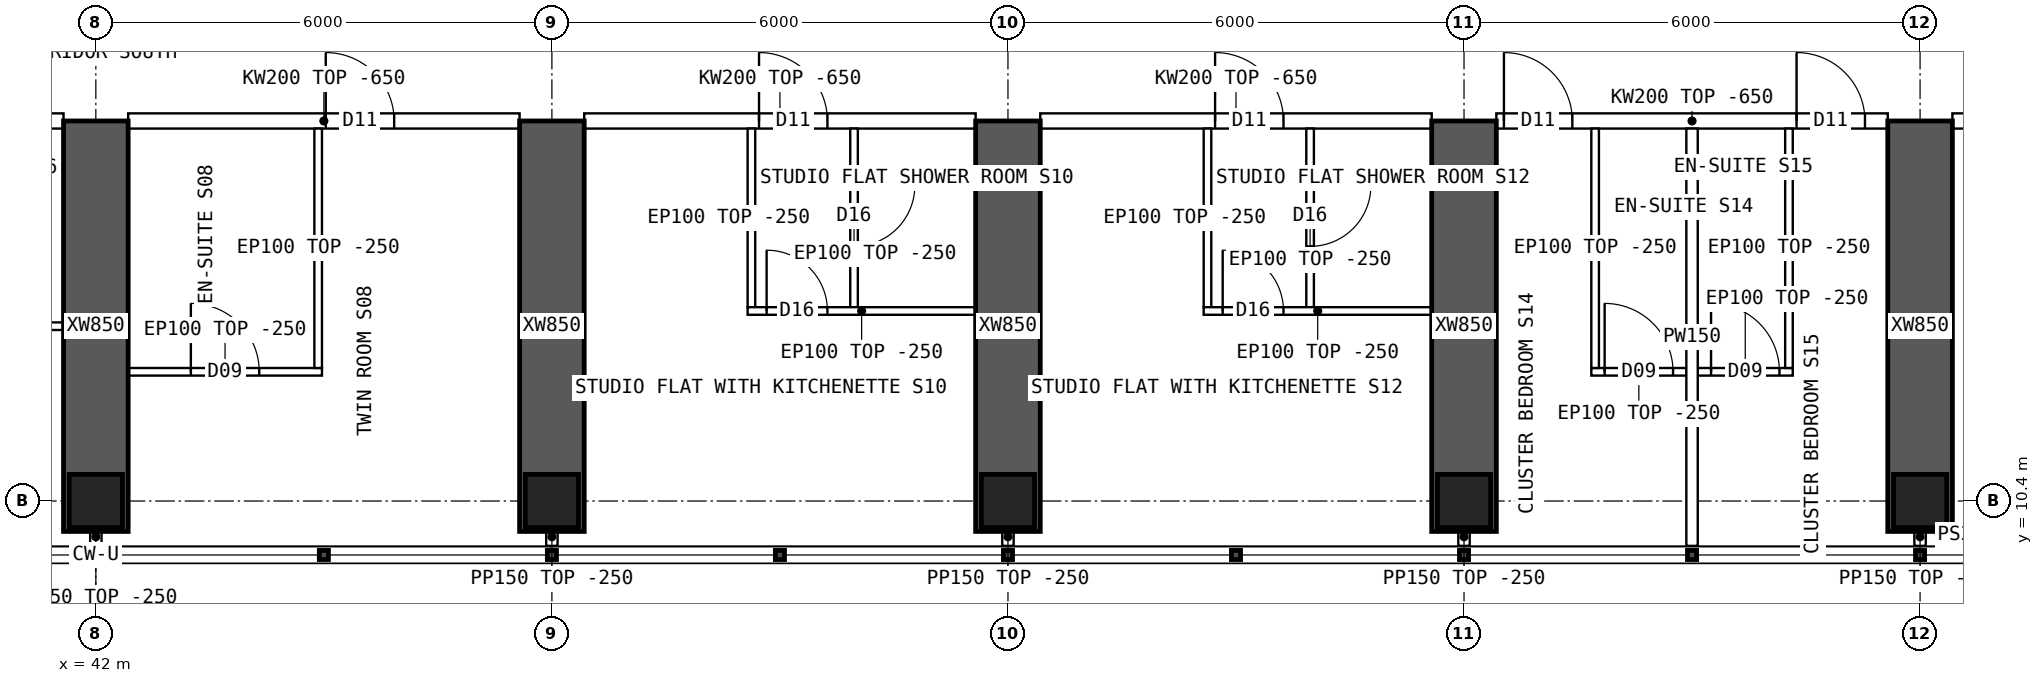
"""IFC4 building model, lengths in metres.
Left out: names, types, materials, properties, quantities, classifications, styles, units other than length and angle.
Written with IfcOpenShell. Run it as: python <this file> out.ifc"""

import sys

from ifc_helpers import new_model, si_unit, direction, frame, frame_2d, origin, origin_2d, place, context, subcontext, project, spatial, polyline, rectangle, hollow_rectangle, outline, extrude, element, fill, save


model = new_model("IFC4")
c1 = context("Model", 3, precision=1e-05, world=origin(), true_north=direction((0.0, 1.0)))
c2 = subcontext(c1, "Body", "Model", "MODEL_VIEW")
j1 = project(units=[si_unit("LENGTHUNIT", "METRE"), si_unit("PLANEANGLEUNIT", "RADIAN")], contexts=[c1])
p1 = place(None, origin())
s1 = spatial("IfcSite", under=j1, at=p1, CompositionType="ELEMENT")
p2 = place(p1, origin())
s2 = spatial("IfcBuilding", under=s1, at=p2, CompositionType="ELEMENT")
p3 = place(p2, frame((0.0, 0.0, 178.6)))
s3 = spatial("IfcBuildingStorey", under=s2, at=p3, CompositionType="ELEMENT", Elevation=178.6)
for number, where, z_axis, x_axis in (
    (1, (42.0, 10.4, 0.0), (0.0, 0.0, 1.0), (1.0, 0.0, 0.0)),
    (2, (48.0, 10.4, 0.0), (0.0, 0.0, 1.0), (1.0, 0.0, 0.0)),
    (3, (54.0, 10.4, 0.0), (0.0, 0.0, 1.0), (1.0, 0.0, 0.0)),
    (4, (60.0, 10.4, 0.0), (0.0, 0.0, 1.0), (1.0, 0.0, 0.0)),
    (5, (66.0, 10.4, 0.0), (0.0, 0.0, 1.0), (1.0, 0.0, 0.0)),
):
    element("IfcColumn", number, at=place(p3, frame(where, z_axis=z_axis, x_axis=x_axis)), inside=s3, PredefinedType="COLUMN", context=c2, shape_type="SweptSolid", body=[
        extrude(hollow_rectangle(XDim=0.7, YDim=0.7, WallThickness=0.07, at=origin_2d()), origin(), (0.0, 0.0, 1.0), 3.75),
    ])
for number, where, z_axis, x_axis in (
    (6, (42.0, 10.0, 0.0), (0.0, 0.0, 1.0), (0.0, 1.0, 0.0)),
    (7, (48.0, 10.0, 0.0), (0.0, 0.0, 1.0), (0.0, 1.0, 0.0)),
    (8, (54.0, 10.0, 0.0), (0.0, 0.0, 1.0), (0.0, 1.0, 0.0)),
    (9, (60.0, 10.0, 0.0), (0.0, 0.0, 1.0), (0.0, 1.0, 0.0)),
    (10, (66.0, 10.0, 0.0), (0.0, 0.0, 1.0), (0.0, 1.0, 0.0)),
):
    element("IfcWall", number, at=place(p3, frame(where, z_axis=z_axis, x_axis=x_axis)), inside=s3, PredefinedType="SHEAR", context=c2, shape_type="SweptSolid", body=[
        extrude(rectangle(XDim=5.4, YDim=0.85, at=frame_2d((2.7, 0.0))), origin(), (0.0, 0.0, 1.0), 3.75),
    ])
p4 = place(p3, frame((66.8, 9.95, 0.0), z_axis=(0.0, 0.0, 1.0), x_axis=(-1.0, 0.0, 0.0)))
e11 = element("IfcWall", 11, at=p4, inside=s3, PredefinedType="SOLIDWALL", context=c2, shape_type="SweptSolid", body=[
    extrude(rectangle(XDim=0.375, YDim=0.3, at=frame_2d((0.188, 0.0))), origin(), (0.0, 0.0, 1.0), 3.5),
])
p5 = place(p3, frame((36.425, 15.4, 0.0), z_axis=(0.0, 0.0, 1.0), x_axis=(1.0, 0.0, 0.0)))
e12 = element("IfcWall", 12, at=p5, inside=s3, PredefinedType="SOLIDWALL", context=c2, shape_type="SweptSolid", body=[
    extrude(outline(polyline([(0.0, 0.0), (5.15, 0.0), (5.15, 3.1), (0.0, 3.1), (0.0, 0.0)])), frame((0.0, 0.1, 0.0), z_axis=(0.0, -1.0, 0.0), x_axis=(1.0, 0.0, 0.0)), (0.0, 0.0, 1.0), 0.2),
])
p6 = place(p5, frame((0.3, 0.0, 0.0)))
e13 = element("IfcOpeningElement", 13, at=p6, cuts=e12, PredefinedType="OPENING", context=c2, shape_type="SweptSolid", body=[
    extrude(rectangle(XDim=1.0, YDim=2.1, at=frame_2d((0.5, 1.05))), frame((0.0, 0.11, 0.0), z_axis=(0.0, -1.0, 0.0), x_axis=(1.0, 0.0, 0.0)), (0.0, 0.0, 1.0), 0.22),
])
p7 = place(p3, frame((42.425, 15.4, 0.0), z_axis=(0.0, 0.0, 1.0), x_axis=(1.0, 0.0, 0.0)))
e14 = element("IfcWall", 14, at=p7, inside=s3, PredefinedType="SOLIDWALL", context=c2, shape_type="SweptSolid", body=[
    extrude(outline(polyline([(0.0, 0.0), (5.15, 0.0), (5.15, 3.1), (0.0, 3.1), (0.0, 0.0)])), frame((0.0, 0.1, 0.0), z_axis=(0.0, -1.0, 0.0), x_axis=(1.0, 0.0, 0.0)), (0.0, 0.0, 1.0), 0.2),
])
p8 = place(p7, frame((2.6, 0.0, 0.0)))
e15 = element("IfcOpeningElement", 15, at=p8, cuts=e14, PredefinedType="OPENING", context=c2, shape_type="SweptSolid", body=[
    extrude(rectangle(XDim=0.9, YDim=2.1, at=frame_2d((0.45, 1.05))), frame((0.0, 0.11, 0.0), z_axis=(0.0, -1.0, 0.0), x_axis=(1.0, 0.0, 0.0)), (0.0, 0.0, 1.0), 0.22),
])
p9 = place(p3, frame((48.425, 15.4, 0.0), z_axis=(0.0, 0.0, 1.0), x_axis=(1.0, 0.0, 0.0)))
e16 = element("IfcWall", 16, at=p9, inside=s3, PredefinedType="SOLIDWALL", context=c2, shape_type="SweptSolid", body=[
    extrude(outline(polyline([(0.0, 0.0), (5.15, 0.0), (5.15, 3.1), (0.0, 3.1), (0.0, 0.0)])), frame((0.0, 0.1, 0.0), z_axis=(0.0, -1.0, 0.0), x_axis=(1.0, 0.0, 0.0)), (0.0, 0.0, 1.0), 0.2),
])
p10 = place(p9, frame((2.3, 0.0, 0.0)))
e17 = element("IfcOpeningElement", 17, at=p10, cuts=e16, PredefinedType="OPENING", context=c2, shape_type="SweptSolid", body=[
    extrude(rectangle(XDim=0.9, YDim=2.1, at=frame_2d((0.45, 1.05))), frame((0.0, 0.11, 0.0), z_axis=(0.0, -1.0, 0.0), x_axis=(1.0, 0.0, 0.0)), (0.0, 0.0, 1.0), 0.22),
])
p11 = place(p3, frame((54.425, 15.4, 0.0), z_axis=(0.0, 0.0, 1.0), x_axis=(1.0, 0.0, 0.0)))
e18 = element("IfcWall", 18, at=p11, inside=s3, PredefinedType="SOLIDWALL", context=c2, shape_type="SweptSolid", body=[
    extrude(outline(polyline([(0.0, 0.0), (5.15, 0.0), (5.15, 3.1), (0.0, 3.1), (0.0, 0.0)])), frame((0.0, 0.1, 0.0), z_axis=(0.0, -1.0, 0.0), x_axis=(1.0, 0.0, 0.0)), (0.0, 0.0, 1.0), 0.2),
])
p12 = place(p11, frame((2.3, 0.0, 0.0)))
e19 = element("IfcOpeningElement", 19, at=p12, cuts=e18, PredefinedType="OPENING", context=c2, shape_type="SweptSolid", body=[
    extrude(rectangle(XDim=0.9, YDim=2.1, at=frame_2d((0.45, 1.05))), frame((0.0, 0.11, 0.0), z_axis=(0.0, -1.0, 0.0), x_axis=(1.0, 0.0, 0.0)), (0.0, 0.0, 1.0), 0.22),
])
p13 = place(p3, frame((60.425, 15.4, 0.0), z_axis=(0.0, 0.0, 1.0), x_axis=(1.0, 0.0, 0.0)))
e20 = element("IfcWall", 20, at=p13, inside=s3, PredefinedType="SOLIDWALL", context=c2, shape_type="SweptSolid", body=[
    extrude(outline(polyline([(0.0, 0.0), (5.15, 0.0), (5.15, 3.1), (0.0, 3.1), (0.0, 0.0)])), frame((0.0, 0.1, 0.0), z_axis=(0.0, -1.0, 0.0), x_axis=(1.0, 0.0, 0.0)), (0.0, 0.0, 1.0), 0.2),
])
p14 = place(p13, frame((0.1, 0.0, 0.0)))
e21 = element("IfcOpeningElement", 21, at=p14, cuts=e20, PredefinedType="OPENING", context=c2, shape_type="SweptSolid", body=[
    extrude(rectangle(XDim=0.9, YDim=2.1, at=frame_2d((0.45, 1.05))), frame((0.0, 0.11, 0.0), z_axis=(0.0, -1.0, 0.0), x_axis=(1.0, 0.0, 0.0)), (0.0, 0.0, 1.0), 0.22),
])
p15 = place(p13, frame((3.95, 0.0, 0.0)))
e22 = element("IfcOpeningElement", 22, at=p15, cuts=e20, PredefinedType="OPENING", context=c2, shape_type="SweptSolid", body=[
    extrude(rectangle(XDim=0.9, YDim=2.1, at=frame_2d((0.45, 1.05))), frame((0.0, 0.11, 0.0), z_axis=(0.0, -1.0, 0.0), x_axis=(1.0, 0.0, 0.0)), (0.0, 0.0, 1.0), 0.22),
])
p16 = place(p3, frame((66.425, 15.4, 0.0), z_axis=(0.0, 0.0, 1.0), x_axis=(1.0, 0.0, 0.0)))
e23 = element("IfcWall", 23, at=p16, inside=s3, PredefinedType="SOLIDWALL", context=c2, shape_type="SweptSolid", body=[
    extrude(rectangle(XDim=1.975, YDim=0.2, at=frame_2d((0.987, 0.0))), origin(), (0.0, 0.0, 1.0), 3.5),
])
p17 = place(p16, frame((0.2, 0.0, 0.0)))
e24 = element("IfcOpeningElement", 24, at=p17, cuts=e23, PredefinedType="OPENING", context=c2, shape_type="SweptSolid", body=[
    extrude(rectangle(XDim=0.9, YDim=2.1, at=frame_2d((0.45, 1.05))), frame((0.0, 0.11, 0.0), z_axis=(0.0, -1.0, 0.0), x_axis=(1.0, 0.0, 0.0)), (0.0, 0.0, 1.0), 0.22),
])
p18 = place(p3, frame((38.925, 12.7, 0.0), z_axis=(0.0, 0.0, 1.0), x_axis=(1.0, 0.0, 0.0)))
e25 = element("IfcWall", 25, at=p18, inside=s3, PredefinedType="PARTITIONING", context=c2, shape_type="SweptSolid", body=[
    extrude(rectangle(XDim=2.65, YDim=0.1, at=frame_2d((1.325, 0.0))), origin(), (0.0, 0.0, 1.0), 3.5),
])
p19 = place(p3, frame((44.975, 12.1, 0.0), z_axis=(0.0, 0.0, 1.0), x_axis=(-1.0, 0.0, 0.0)))
e26 = element("IfcWall", 26, at=p19, inside=s3, PredefinedType="PARTITIONING", context=c2, shape_type="SweptSolid", body=[
    extrude(rectangle(XDim=2.55, YDim=0.1, at=frame_2d((1.275, 0.0))), origin(), (0.0, 0.0, 1.0), 3.5),
])
p20 = place(p19, frame((0.825, 0.0, 0.0)))
e27 = element("IfcOpeningElement", 27, at=p20, cuts=e26, PredefinedType="OPENING", context=c2, shape_type="SweptSolid", body=[
    extrude(rectangle(XDim=0.9, YDim=2.1, at=frame_2d((0.45, 1.05))), frame((0.0, 0.06, 0.0), z_axis=(0.0, -1.0, 0.0), x_axis=(1.0, 0.0, 0.0)), (0.0, 0.0, 1.0), 0.12),
])
p21 = place(p3, frame((44.925, 12.15, 0.0), z_axis=(0.0, 0.0, 1.0), x_axis=(0.0, 1.0, 0.0)))
e28 = element("IfcWall", 28, at=p21, inside=s3, PredefinedType="PARTITIONING", context=c2, shape_type="SweptSolid", body=[
    extrude(outline(polyline([(0.0, 0.0), (3.15, 0.0), (3.15, 3.1), (3.102, 3.1), (3.1, 3.5), (0.0, 3.5), (0.0, 0.0)])), frame((0.0, 0.05, 0.0), z_axis=(0.0, -1.0, 0.0), x_axis=(1.0, 0.0, 0.0)), (0.0, 0.0, 1.0), 0.1),
])
p22 = place(p3, frame((53.575, 12.9, 0.0), z_axis=(0.0, 0.0, 1.0), x_axis=(-1.0, 0.0, 0.0)))
e29 = element("IfcWall", 29, at=p22, inside=s3, PredefinedType="PARTITIONING", context=c2, shape_type="SweptSolid", body=[
    extrude(rectangle(XDim=3.0, YDim=0.1, at=frame_2d((1.5, 0.0))), origin(), (0.0, 0.0, 1.0), 3.5),
])
p23 = place(p22, frame((1.95, 0.0, 0.0)))
e30 = element("IfcOpeningElement", 30, at=p23, cuts=e29, PredefinedType="OPENING", context=c2, shape_type="SweptSolid", body=[
    extrude(rectangle(XDim=0.8, YDim=2.1, at=frame_2d((0.4, 1.05))), frame((0.0, 0.06, 0.0), z_axis=(0.0, -1.0, 0.0), x_axis=(1.0, 0.0, 0.0)), (0.0, 0.0, 1.0), 0.12),
])
p24 = place(p3, frame((50.625, 12.95, 0.0), z_axis=(0.0, 0.0, 1.0), x_axis=(0.0, 1.0, 0.0)))
e31 = element("IfcWall", 31, at=p24, inside=s3, PredefinedType="PARTITIONING", context=c2, shape_type="SweptSolid", body=[
    extrude(outline(polyline([(0.0, 0.0), (2.35, 0.0), (2.35, 3.1), (2.302, 3.1), (2.3, 3.5), (0.0, 3.5), (0.0, 0.0)])), frame((0.0, 0.05, 0.0), z_axis=(0.0, -1.0, 0.0), x_axis=(1.0, 0.0, 0.0)), (0.0, 0.0, 1.0), 0.1),
])
p25 = place(p3, frame((51.975, 12.95, 0.0), z_axis=(0.0, 0.0, 1.0), x_axis=(0.0, 1.0, 0.0)))
e32 = element("IfcWall", 32, at=p25, inside=s3, PredefinedType="PARTITIONING", context=c2, shape_type="SweptSolid", body=[
    extrude(outline(polyline([(0.0, 0.0), (2.35, 0.0), (2.35, 3.1), (2.302, 3.1), (2.3, 3.5), (0.0, 3.5), (0.0, 0.0)])), frame((0.0, 0.05, 0.0), z_axis=(0.0, -1.0, 0.0), x_axis=(1.0, 0.0, 0.0)), (0.0, 0.0, 1.0), 0.1),
])
p26 = place(p25, frame((0.8, 0.0, 0.0)))
e33 = element("IfcOpeningElement", 33, at=p26, cuts=e32, PredefinedType="OPENING", context=c2, shape_type="SweptSolid", body=[
    extrude(rectangle(XDim=0.8, YDim=2.1, at=frame_2d((0.4, 1.05))), frame((0.0, 0.06, 0.0), z_axis=(0.0, -1.0, 0.0), x_axis=(1.0, 0.0, 0.0)), (0.0, 0.0, 1.0), 0.12),
])
p27 = place(p3, frame((59.575, 12.9, 0.0), z_axis=(0.0, 0.0, 1.0), x_axis=(-1.0, 0.0, 0.0)))
e34 = element("IfcWall", 34, at=p27, inside=s3, PredefinedType="PARTITIONING", context=c2, shape_type="SweptSolid", body=[
    extrude(rectangle(XDim=3.0, YDim=0.1, at=frame_2d((1.5, 0.0))), origin(), (0.0, 0.0, 1.0), 3.5),
])
p28 = place(p27, frame((1.95, 0.0, 0.0)))
e35 = element("IfcOpeningElement", 35, at=p28, cuts=e34, PredefinedType="OPENING", context=c2, shape_type="SweptSolid", body=[
    extrude(rectangle(XDim=0.8, YDim=2.1, at=frame_2d((0.4, 1.05))), frame((0.0, 0.06, 0.0), z_axis=(0.0, -1.0, 0.0), x_axis=(1.0, 0.0, 0.0)), (0.0, 0.0, 1.0), 0.12),
])
p29 = place(p3, frame((56.625, 12.95, 0.0), z_axis=(0.0, 0.0, 1.0), x_axis=(0.0, 1.0, 0.0)))
e36 = element("IfcWall", 36, at=p29, inside=s3, PredefinedType="PARTITIONING", context=c2, shape_type="SweptSolid", body=[
    extrude(outline(polyline([(0.0, 0.0), (2.35, 0.0), (2.35, 3.1), (2.302, 3.1), (2.3, 3.5), (0.0, 3.5), (0.0, 0.0)])), frame((0.0, 0.05, 0.0), z_axis=(0.0, -1.0, 0.0), x_axis=(1.0, 0.0, 0.0)), (0.0, 0.0, 1.0), 0.1),
])
p30 = place(p3, frame((57.975, 12.95, 0.0), z_axis=(0.0, 0.0, 1.0), x_axis=(0.0, 1.0, 0.0)))
e37 = element("IfcWall", 37, at=p30, inside=s3, PredefinedType="PARTITIONING", context=c2, shape_type="SweptSolid", body=[
    extrude(outline(polyline([(0.0, 0.0), (2.35, 0.0), (2.35, 3.1), (2.302, 3.1), (2.3, 3.5), (0.0, 3.5), (0.0, 0.0)])), frame((0.0, 0.05, 0.0), z_axis=(0.0, -1.0, 0.0), x_axis=(1.0, 0.0, 0.0)), (0.0, 0.0, 1.0), 0.1),
])
p31 = place(p30, frame((0.8, 0.0, 0.0)))
e38 = element("IfcOpeningElement", 38, at=p31, cuts=e37, PredefinedType="OPENING", context=c2, shape_type="SweptSolid", body=[
    extrude(rectangle(XDim=0.8, YDim=2.1, at=frame_2d((0.4, 1.05))), frame((0.0, 0.06, 0.0), z_axis=(0.0, -1.0, 0.0), x_axis=(1.0, 0.0, 0.0)), (0.0, 0.0, 1.0), 0.12),
])
p32 = place(p3, frame((63.0, 9.81, 0.0), z_axis=(0.0, 0.0, 1.0), x_axis=(0.0, 1.0, 0.0)))
e39 = element("IfcWall", 39, at=p32, inside=s3, PredefinedType="PARTITIONING", context=c2, shape_type="SweptSolid", body=[
    extrude(outline(polyline([(0.0, 0.0), (5.49, 0.0), (5.49, 3.1), (5.442, 3.1), (5.44, 3.5), (0.792, 3.5), (0.79, 3.1), (0.392, 3.1), (0.39, 3.5), (0.0, 3.5), (0.0, 0.0)])), frame((0.0, 0.075, 0.0), z_axis=(0.0, -1.0, 0.0), x_axis=(1.0, 0.0, 0.0)), (0.0, 0.0, 1.0), 0.15),
])
p33 = place(p3, frame((62.925, 12.1, 0.0), z_axis=(0.0, 0.0, 1.0), x_axis=(-1.0, 0.0, 0.0)))
e40 = element("IfcWall", 40, at=p33, inside=s3, PredefinedType="PARTITIONING", context=c2, shape_type="SweptSolid", body=[
    extrude(rectangle(XDim=1.25, YDim=0.1, at=frame_2d((0.625, 0.0))), origin(), (0.0, 0.0, 1.0), 3.5),
])
p34 = place(p33, frame((0.175, 0.0, 0.0)))
e41 = element("IfcOpeningElement", 41, at=p34, cuts=e40, PredefinedType="OPENING", context=c2, shape_type="SweptSolid", body=[
    extrude(rectangle(XDim=0.9, YDim=2.1, at=frame_2d((0.45, 1.05))), frame((0.0, 0.06, 0.0), z_axis=(0.0, -1.0, 0.0), x_axis=(1.0, 0.0, 0.0)), (0.0, 0.0, 1.0), 0.12),
])
p35 = place(p3, frame((61.725, 12.15, 0.0), z_axis=(0.0, 0.0, 1.0), x_axis=(0.0, 1.0, 0.0)))
e42 = element("IfcWall", 42, at=p35, inside=s3, PredefinedType="PARTITIONING", context=c2, shape_type="SweptSolid", body=[
    extrude(outline(polyline([(0.0, 0.0), (3.15, 0.0), (3.15, 3.1), (3.102, 3.1), (3.1, 3.5), (0.0, 3.5), (0.0, 0.0)])), frame((0.0, 0.05, 0.0), z_axis=(0.0, -1.0, 0.0), x_axis=(1.0, 0.0, 0.0)), (0.0, 0.0, 1.0), 0.1),
])
p36 = place(p3, frame((64.325, 12.1, 0.0), z_axis=(0.0, 0.0, 1.0), x_axis=(-1.0, 0.0, 0.0)))
e43 = element("IfcWall", 43, at=p36, inside=s3, PredefinedType="PARTITIONING", context=c2, shape_type="SweptSolid", body=[
    extrude(rectangle(XDim=1.25, YDim=0.1, at=frame_2d((0.625, 0.0))), origin(), (0.0, 0.0, 1.0), 3.5),
])
p37 = place(p36, frame((0.175, 0.0, 0.0)))
e44 = element("IfcOpeningElement", 44, at=p37, cuts=e43, PredefinedType="OPENING", context=c2, shape_type="SweptSolid", body=[
    extrude(rectangle(XDim=0.9, YDim=2.1, at=frame_2d((0.45, 1.05))), frame((0.0, 0.06, 0.0), z_axis=(0.0, -1.0, 0.0), x_axis=(1.0, 0.0, 0.0)), (0.0, 0.0, 1.0), 0.12),
])
p38 = place(p3, frame((64.275, 12.15, 0.0), z_axis=(0.0, 0.0, 1.0), x_axis=(0.0, 1.0, 0.0)))
e45 = element("IfcWall", 45, at=p38, inside=s3, PredefinedType="PARTITIONING", context=c2, shape_type="SweptSolid", body=[
    extrude(outline(polyline([(0.0, 0.0), (3.15, 0.0), (3.15, 3.1), (3.102, 3.1), (3.1, 3.5), (0.0, 3.5), (0.0, 0.0)])), frame((0.0, 0.05, 0.0), z_axis=(0.0, -1.0, 0.0), x_axis=(1.0, 0.0, 0.0)), (0.0, 0.0, 1.0), 0.1),
])
for number, where, z_axis, x_axis in (
    (46, (42.0, 10.05, 0.0), (0.0, 0.0, 1.0), (0.0, -1.0, 0.0)),
    (47, (48.0, 10.05, 0.0), (0.0, 0.0, 1.0), (0.0, -1.0, 0.0)),
    (48, (54.0, 10.05, 0.0), (0.0, 0.0, 1.0), (0.0, -1.0, 0.0)),
    (49, (60.0, 10.05, 0.0), (0.0, 0.0, 1.0), (0.0, -1.0, 0.0)),
    (50, (66.0, 10.05, 0.0), (0.0, 0.0, 1.0), (0.0, -1.0, 0.0)),
):
    element("IfcWall", number, at=place(p3, frame(where, z_axis=z_axis, x_axis=x_axis)), inside=s3, PredefinedType="PARTITIONING", context=c2, shape_type="SweptSolid", body=[
        extrude(rectangle(XDim=0.24, YDim=0.15, at=frame_2d((0.12, 0.0))), origin(), (0.0, 0.0, 1.0), 3.5),
    ])
p39 = place(p20, origin())
e51 = element("IfcDoor", 51, at=p39, inside=s3, OperationType="SINGLE_SWING_RIGHT", PredefinedType="DOOR", context=c2, shape_type="SweptSolid", body=[
    extrude(rectangle(XDim=0.9, YDim=2.1, at=frame_2d((0.45, 1.05))), frame((0.0, 0.025, 0.0), z_axis=(0.0, -1.0, 0.0), x_axis=(1.0, 0.0, 0.0)), (0.0, 0.0, 1.0), 0.05),
])
fill(e27, e51)
p40 = place(p8, origin())
e52 = element("IfcDoor", 52, at=p40, inside=s3, OperationType="SINGLE_SWING_LEFT", PredefinedType="DOOR", context=c2, shape_type="SweptSolid", body=[
    extrude(rectangle(XDim=0.9, YDim=2.1, at=frame_2d((0.45, 1.05))), frame((0.0, 0.025, 0.0), z_axis=(0.0, -1.0, 0.0), x_axis=(1.0, 0.0, 0.0)), (0.0, 0.0, 1.0), 0.05),
])
fill(e15, e52)
p41 = place(p23, origin())
e53 = element("IfcDoor", 53, at=p41, inside=s3, OperationType="SINGLE_SWING_RIGHT", PredefinedType="DOOR", context=c2, shape_type="SweptSolid", body=[
    extrude(rectangle(XDim=0.8, YDim=2.1, at=frame_2d((0.4, 1.05))), frame((0.0, 0.025, 0.0), z_axis=(0.0, -1.0, 0.0), x_axis=(1.0, 0.0, 0.0)), (0.0, 0.0, 1.0), 0.05),
])
fill(e30, e53)
p42 = place(p26, origin())
e54 = element("IfcDoor", 54, at=p42, inside=s3, OperationType="SINGLE_SWING_RIGHT", PredefinedType="DOOR", context=c2, shape_type="SweptSolid", body=[
    extrude(rectangle(XDim=0.8, YDim=2.1, at=frame_2d((0.4, 1.05))), frame((0.0, 0.025, 0.0), z_axis=(0.0, -1.0, 0.0), x_axis=(1.0, 0.0, 0.0)), (0.0, 0.0, 1.0), 0.05),
])
fill(e33, e54)
p43 = place(p10, origin())
e55 = element("IfcDoor", 55, at=p43, inside=s3, OperationType="SINGLE_SWING_LEFT", PredefinedType="DOOR", context=c2, shape_type="SweptSolid", body=[
    extrude(rectangle(XDim=0.9, YDim=2.1, at=frame_2d((0.45, 1.05))), frame((0.0, 0.025, 0.0), z_axis=(0.0, -1.0, 0.0), x_axis=(1.0, 0.0, 0.0)), (0.0, 0.0, 1.0), 0.05),
])
fill(e17, e55)
p44 = place(p28, origin())
e56 = element("IfcDoor", 56, at=p44, inside=s3, OperationType="SINGLE_SWING_RIGHT", PredefinedType="DOOR", context=c2, shape_type="SweptSolid", body=[
    extrude(rectangle(XDim=0.8, YDim=2.1, at=frame_2d((0.4, 1.05))), frame((0.0, 0.025, 0.0), z_axis=(0.0, -1.0, 0.0), x_axis=(1.0, 0.0, 0.0)), (0.0, 0.0, 1.0), 0.05),
])
fill(e35, e56)
p45 = place(p31, origin())
e57 = element("IfcDoor", 57, at=p45, inside=s3, OperationType="SINGLE_SWING_RIGHT", PredefinedType="DOOR", context=c2, shape_type="SweptSolid", body=[
    extrude(rectangle(XDim=0.8, YDim=2.1, at=frame_2d((0.4, 1.05))), frame((0.0, 0.025, 0.0), z_axis=(0.0, -1.0, 0.0), x_axis=(1.0, 0.0, 0.0)), (0.0, 0.0, 1.0), 0.05),
])
fill(e38, e57)
p46 = place(p12, origin())
e58 = element("IfcDoor", 58, at=p46, inside=s3, OperationType="SINGLE_SWING_LEFT", PredefinedType="DOOR", context=c2, shape_type="SweptSolid", body=[
    extrude(rectangle(XDim=0.9, YDim=2.1, at=frame_2d((0.45, 1.05))), frame((0.0, 0.025, 0.0), z_axis=(0.0, -1.0, 0.0), x_axis=(1.0, 0.0, 0.0)), (0.0, 0.0, 1.0), 0.05),
])
fill(e19, e58)
p47 = place(p34, origin())
e59 = element("IfcDoor", 59, at=p47, inside=s3, OperationType="SINGLE_SWING_RIGHT", PredefinedType="DOOR", context=c2, shape_type="SweptSolid", body=[
    extrude(rectangle(XDim=0.9, YDim=2.1, at=frame_2d((0.45, 1.05))), frame((0.0, 0.025, 0.0), z_axis=(0.0, -1.0, 0.0), x_axis=(1.0, 0.0, 0.0)), (0.0, 0.0, 1.0), 0.05),
])
fill(e41, e59)
p48 = place(p14, origin())
e60 = element("IfcDoor", 60, at=p48, inside=s3, OperationType="SINGLE_SWING_LEFT", PredefinedType="DOOR", context=c2, shape_type="SweptSolid", body=[
    extrude(rectangle(XDim=0.9, YDim=2.1, at=frame_2d((0.45, 1.05))), frame((0.0, 0.025, 0.0), z_axis=(0.0, -1.0, 0.0), x_axis=(1.0, 0.0, 0.0)), (0.0, 0.0, 1.0), 0.05),
])
fill(e21, e60)
p49 = place(p37, origin())
e61 = element("IfcDoor", 61, at=p49, inside=s3, OperationType="SINGLE_SWING_RIGHT", PredefinedType="DOOR", context=c2, shape_type="SweptSolid", body=[
    extrude(rectangle(XDim=0.9, YDim=2.1, at=frame_2d((0.45, 1.05))), frame((0.0, 0.025, 0.0), z_axis=(0.0, -1.0, 0.0), x_axis=(1.0, 0.0, 0.0)), (0.0, 0.0, 1.0), 0.05),
])
fill(e44, e61)
p50 = place(p15, origin())
e62 = element("IfcDoor", 62, at=p50, inside=s3, OperationType="SINGLE_SWING_LEFT", PredefinedType="DOOR", context=c2, shape_type="SweptSolid", body=[
    extrude(rectangle(XDim=0.9, YDim=2.1, at=frame_2d((0.45, 1.05))), frame((0.0, 0.025, 0.0), z_axis=(0.0, -1.0, 0.0), x_axis=(1.0, 0.0, 0.0)), (0.0, 0.0, 1.0), 0.05),
])
fill(e22, e62)
save(model, sys.argv[1])
